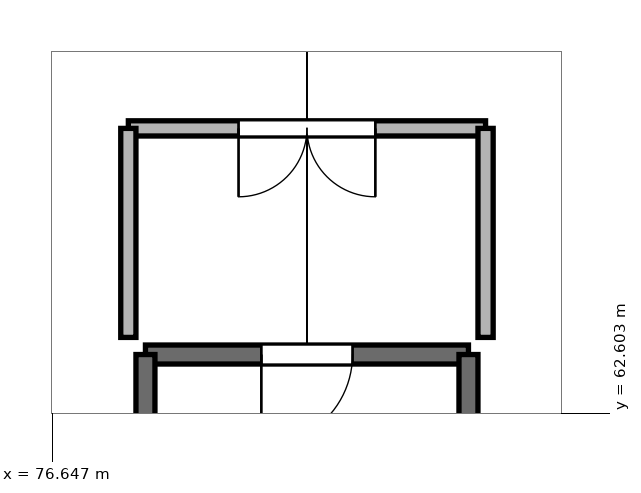
"""IFC4 building model, lengths in metres.
Left out: names, types, materials, properties, quantities, classifications, styles, units other than length and angle.
Written with IfcOpenShell. Run it as: python <this file> out.ifc"""

import sys

from ifc_helpers import new_model, si_unit, direction, frame, frame_2d, origin, place, context, subcontext, project, spatial, rectangle, extrude, element, fill, save


model = new_model("IFC4")
c1 = context("Model", 3, precision=1e-05, world=origin(), true_north=direction((0.0, 1.0)))
c2 = subcontext(c1, "Body", "Model", "MODEL_VIEW")
j1 = project(units=[si_unit("LENGTHUNIT", "METRE"), si_unit("PLANEANGLEUNIT", "RADIAN")], contexts=[c1])
p1 = place(None, origin())
s1 = spatial("IfcSite", under=j1, at=p1, CompositionType="ELEMENT")
p2 = place(p1, origin())
s2 = spatial("IfcBuilding", under=s1, at=p2, CompositionType="ELEMENT")
p3 = place(p2, frame((0.0, 0.0, 63.3)))
s3 = spatial("IfcBuildingStorey", under=s2, at=p3, CompositionType="ELEMENT", Elevation=63.3)
p4 = place(p3, frame((82.125, 63.375, 0.0), z_axis=(0.0, 0.0, 1.0), x_axis=(-1.0, 0.0, 0.0)))
e1 = element("IfcWall", 1, at=p4, inside=s3, PredefinedType="SHEAR", context=c2, shape_type="SweptSolid", body=[
    extrude(rectangle(XDim=4.25, YDim=0.25, at=frame_2d((2.125, 0.0))), origin(), (0.0, 0.0, 1.0), 3.01),
])
p5 = place(p4, frame((1.525, 0.0, 0.0)))
e2 = element("IfcOpeningElement", 2, at=p5, cuts=e1, PredefinedType="OPENING", context=c2, shape_type="SweptSolid", body=[
    extrude(rectangle(XDim=1.2, YDim=2.2, at=frame_2d((0.6, 1.1))), frame((0.0, 0.137, 0.0), z_axis=(0.0, -1.0, 0.0), x_axis=(1.0, 0.0, 0.0)), (0.0, 0.0, 1.0), 0.274),
])
for number, where, z_axis, x_axis in (
    (3, (77.875, 63.375, 0.0), (0.0, 0.0, 1.0), (0.0, -1.0, 0.0)),
    (4, (82.125, 56.175, 0.0), (0.0, 0.0, 1.0), (0.0, 1.0, 0.0)),
):
    element("IfcWall", number, at=place(p3, frame(where, z_axis=z_axis, x_axis=x_axis)), inside=s3, PredefinedType="SHEAR", context=c2, shape_type="SweptSolid", body=[
        extrude(rectangle(XDim=7.2, YDim=0.25, at=frame_2d((3.6, 0.0))), origin(), (0.0, 0.0, 1.0), 3.01),
    ])
p6 = place(p3, frame((77.65, 66.35, 0.0), z_axis=(0.0, 0.0, 1.0), x_axis=(1.0, 0.0, 0.0)))
e5 = element("IfcWall", 5, at=p6, inside=s3, PredefinedType="PARTITIONING", context=c2, shape_type="SweptSolid", body=[
    extrude(rectangle(XDim=4.7, YDim=0.2, at=frame_2d((2.35, 0.0))), origin(), (0.0, 0.0, 1.0), 2.53),
])
p7 = place(p6, frame((1.45, 0.0, 0.0)))
e6 = element("IfcOpeningElement", 6, at=p7, cuts=e5, PredefinedType="OPENING", context=c2, shape_type="SweptSolid", body=[
    extrude(rectangle(XDim=1.8, YDim=2.2, at=frame_2d((0.9, 1.1))), frame((0.0, 0.112, 0.0), z_axis=(0.0, -1.0, 0.0), x_axis=(1.0, 0.0, 0.0)), (0.0, 0.0, 1.0), 0.224),
])
for number, where, z_axis, x_axis in (
    (7, (77.65, 63.6, 0.0), (0.0, 0.0, 1.0), (0.0, 1.0, 0.0)),
    (8, (82.35, 63.6, 0.0), (0.0, 0.0, 1.0), (0.0, 1.0, 0.0)),
):
    element("IfcWall", number, at=place(p3, frame(where, z_axis=z_axis, x_axis=x_axis)), inside=s3, PredefinedType="PARTITIONING", context=c2, shape_type="SweptSolid", body=[
        extrude(rectangle(XDim=2.75, YDim=0.2, at=frame_2d((1.375, 0.0))), origin(), (0.0, 0.0, 1.0), 2.53),
    ])
p8 = place(p5, origin())
e9 = element("IfcDoor", 9, at=p8, inside=s3, OperationType="SINGLE_SWING_RIGHT", PredefinedType="DOOR", context=c2, shape_type="SweptSolid", body=[
    extrude(rectangle(XDim=1.2, YDim=2.2, at=frame_2d((0.6, 1.1))), frame((0.0, 0.025, 0.0), z_axis=(0.0, -1.0, 0.0), x_axis=(1.0, 0.0, 0.0)), (0.0, 0.0, 1.0), 0.05),
])
fill(e2, e9)
p9 = place(p7, frame((1.8, 0.0, 0.0), z_axis=(0.0, 0.0, 1.0), x_axis=(-1.0, 0.0, 0.0)))
e10 = element("IfcDoor", 10, at=p9, inside=s3, OperationType="DOUBLE_DOOR_SINGLE_SWING", PredefinedType="DOOR", context=c2, shape_type="SweptSolid", body=[
    extrude(rectangle(XDim=1.8, YDim=2.2, at=frame_2d((0.9, 1.1))), frame((0.0, 0.025, 0.0), z_axis=(0.0, -1.0, 0.0), x_axis=(1.0, 0.0, 0.0)), (0.0, 0.0, 1.0), 0.05),
])
fill(e6, e10)
save(model, sys.argv[1])
